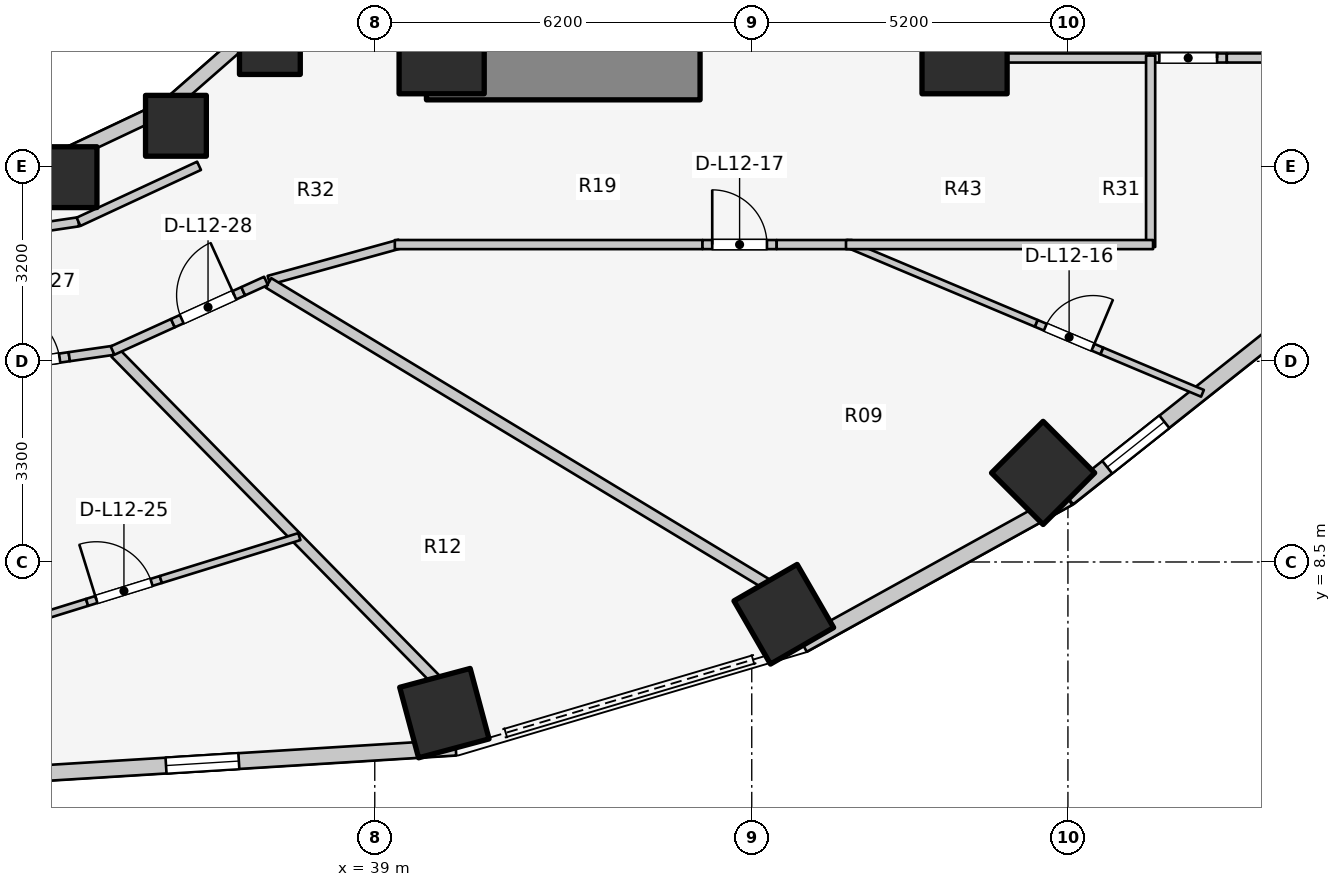
"""IFC4 building model, lengths in metres.
Left out: names, types, materials, properties, quantities, classifications, styles, units other than length and angle.
Written with IfcOpenShell. Run it as: python <this file> out.ifc"""

import sys

from ifc_helpers import new_model, si_unit, direction, frame, frame_2d, origin, origin_2d, place, context, subcontext, project, spatial, rectangle, extrude, element, fill, save


model = new_model("IFC4")
c1 = context("Model", 3, precision=1e-05, world=origin(), true_north=direction((0.0, 1.0)))
c2 = subcontext(c1, "Body", "Model", "MODEL_VIEW")
j1 = project(units=[si_unit("LENGTHUNIT", "METRE"), si_unit("PLANEANGLEUNIT", "RADIAN")], contexts=[c1])
p1 = place(None, origin())
s1 = spatial("IfcSite", under=j1, at=p1, CompositionType="ELEMENT")
p2 = place(p1, origin())
s2 = spatial("IfcBuilding", under=s1, at=p2, CompositionType="ELEMENT")
p3 = place(p2, frame((0.0, 0.0, 43.1)))
s3 = spatial("IfcBuildingStorey", under=s2, at=p3, CompositionType="ELEMENT", Elevation=43.1)
p4 = place(p3, frame((39.85, 16.55, 0.0), z_axis=(0.0, 0.0, 1.0), x_axis=(1.0, 0.0, 0.0)))
e1 = element("IfcWall", 1, at=p4, inside=s3, PredefinedType="SHEAR", context=c2, shape_type="SweptSolid", body=[
    extrude(rectangle(XDim=4.5, YDim=0.9, at=frame_2d((2.25, 0.0))), origin(), (0.0, 0.0, 1.0), 3.1),
])
for number, where, z_axis, x_axis in (
    (2, (40.1, 16.9, 0.0), (0.0, 0.0, 1.0), (1.0, 0.0, 0.0)),
    (3, (48.7, 16.9, 0.0), (0.0, 0.0, 1.0), (1.0, 0.0, 0.0)),
):
    element("IfcColumn", number, at=place(p3, frame(where, z_axis=z_axis, x_axis=x_axis)), inside=s3, PredefinedType="COLUMN", context=c2, shape_type="SweptSolid", body=[
        extrude(rectangle(XDim=1.4, YDim=1.4, at=origin_2d()), origin(), (0.0, 0.0, 1.0), 3.1),
    ])
p5 = place(p3, frame((33.931, 14.828, 0.0), z_axis=(0.0, 0.0, 1.0), x_axis=(1.0, 0.0, 0.0)))
e4 = element("IfcColumn", 4, at=p5, inside=s3, PredefinedType="COLUMN", context=c2, shape_type="SweptSolid", body=[
    extrude(rectangle(XDim=1.0, YDim=1.0, at=origin_2d()), origin(), (0.0, 0.0, 1.0), 3.1),
])
p6 = place(p3, frame((40.145, 6.014, 0.0), z_axis=(0.0, 0.0, 1.0), x_axis=(0.258819045103, -0.965925826289, 0.0)))
e5 = element("IfcColumn", 5, at=p6, inside=s3, PredefinedType="COLUMN", context=c2, shape_type="SweptSolid", body=[
    extrude(rectangle(XDim=1.2, YDim=1.2, at=origin_2d()), origin(), (0.0, 0.0, 1.0), 3.1),
])
p7 = place(p3, frame((35.73, 15.673, 0.0), z_axis=(0.0, 0.0, 1.0), x_axis=(1.0, 0.0, 0.0)))
e6 = element("IfcColumn", 6, at=p7, inside=s3, PredefinedType="COLUMN", context=c2, shape_type="SweptSolid", body=[
    extrude(rectangle(XDim=1.0, YDim=1.0, at=origin_2d()), origin(), (0.0, 0.0, 1.0), 3.1),
])
p8 = place(p3, frame((45.727, 7.641, 0.0), z_axis=(0.0, 0.0, 1.0), x_axis=(0.5, -0.866025403784, 0.0)))
e7 = element("IfcColumn", 7, at=p8, inside=s3, PredefinedType="COLUMN", context=c2, shape_type="SweptSolid", body=[
    extrude(rectangle(XDim=1.2, YDim=1.2, at=origin_2d()), origin(), (0.0, 0.0, 1.0), 3.1),
])
p9 = place(p3, frame((37.275, 17.018, 0.0), z_axis=(0.0, 0.0, 1.0), x_axis=(1.0, 0.0, 0.0)))
e8 = element("IfcColumn", 8, at=p9, inside=s3, PredefinedType="COLUMN", context=c2, shape_type="SweptSolid", body=[
    extrude(rectangle(XDim=1.0, YDim=1.0, at=origin_2d()), origin(), (0.0, 0.0, 1.0), 3.1),
])
p10 = place(p3, frame((49.992, 9.965, 0.0), z_axis=(0.0, 0.0, 1.0), x_axis=(0.707106781187, -0.707106781187, 0.0)))
e9 = element("IfcColumn", 9, at=p10, inside=s3, PredefinedType="COLUMN", context=c2, shape_type="SweptSolid", body=[
    extrude(rectangle(XDim=1.2, YDim=1.2, at=origin_2d()), origin(), (0.0, 0.0, 1.0), 3.1),
])
p11 = place(p3, frame((32.0, 14.88, 0.0), z_axis=(0.0, 0.0, 1.0), x_axis=(0.988901730308, 0.148571086668, 0.0)))
e10 = element("IfcWall", 10, at=p11, inside=s3, PredefinedType="STANDARD", context=c2, shape_type="SweptSolid", body=[
    extrude(rectangle(XDim=1.864, YDim=0.23, at=frame_2d((0.932, 0.0))), origin(), (0.0, 0.0, 1.0), 1.22),
])
p12 = place(p3, frame((33.843, 15.157, 0.0), z_axis=(0.0, 0.0, 1.0), x_axis=(0.904179699603, 0.427152280606, 0.0)))
e11 = element("IfcWall", 11, at=p12, inside=s3, PredefinedType="STANDARD", context=c2, shape_type="SweptSolid", body=[
    extrude(rectangle(XDim=1.899, YDim=0.23, at=frame_2d((0.95, 0.0))), origin(), (0.0, 0.0, 1.0), 1.22),
])
p13 = place(p3, frame((35.56, 15.968, 0.0), z_axis=(0.0, 0.0, 1.0), x_axis=(0.752576694707, 0.658504607869, 0.0)))
e12 = element("IfcWall", 12, at=p13, inside=s3, PredefinedType="STANDARD", context=c2, shape_type="SweptSolid", body=[
    extrude(rectangle(XDim=1.959, YDim=0.23, at=frame_2d((0.98, 0.0))), origin(), (0.0, 0.0, 1.0), 1.22),
])
p14 = place(p3, frame((32.0, 4.931, 0.0), z_axis=(0.0, 0.0, 1.0), x_axis=(0.998090514779, 0.061768311519, 0.0)))
e13 = element("IfcWall", 13, at=p14, inside=s3, PredefinedType="STANDARD", context=c2, shape_type="SweptSolid", body=[
    extrude(rectangle(XDim=8.348, YDim=0.26, at=frame_2d((4.174, 0.0))), origin(), (0.0, 0.0, 1.0), 1.22),
])
p15 = place(p14, frame((3.574, 0.0, 0.15)))
e14 = element("IfcOpeningElement", 14, at=p15, cuts=e13, PredefinedType="OPENING", context=c2, shape_type="SweptSolid", body=[
    extrude(rectangle(XDim=1.2, YDim=0.9, at=frame_2d((0.6, 0.45))), frame((0.0, 0.14, 0.0), z_axis=(0.0, -1.0, 0.0), x_axis=(1.0, 0.0, 0.0)), (0.0, 0.0, 1.0), 0.28),
])
p16 = place(p3, frame((46.042, 7.138, 0.0), z_axis=(0.0, 0.0, 1.0), x_axis=(0.875137303239, 0.483874674352, 0.0)))
e15 = element("IfcWall", 15, at=p16, inside=s3, PredefinedType="STANDARD", context=c2, shape_type="SweptSolid", body=[
    extrude(rectangle(XDim=4.985, YDim=0.26, at=frame_2d((2.493, 0.0))), origin(), (0.0, 0.0, 1.0), 1.22),
])
p17 = place(p3, frame((50.405, 9.55, 0.0), z_axis=(0.0, 0.0, 1.0), x_axis=(0.783123133379, 0.621866672179, 0.0)))
e16 = element("IfcWall", 16, at=p17, inside=s3, PredefinedType="STANDARD", context=c2, shape_type="SweptSolid", body=[
    extrude(rectangle(XDim=4.839, YDim=0.26, at=frame_2d((2.419, 0.0))), origin(), (0.0, 0.0, 1.0), 1.22),
])
p18 = place(p17, frame((0.819, 0.0, 0.15)))
e17 = element("IfcOpeningElement", 17, at=p18, cuts=e16, PredefinedType="OPENING", context=c2, shape_type="SweptSolid", body=[
    extrude(rectangle(XDim=1.2, YDim=0.9, at=frame_2d((0.6, 0.45))), frame((0.0, 0.14, 0.0), z_axis=(0.0, -1.0, 0.0), x_axis=(1.0, 0.0, 0.0)), (0.0, 0.0, 1.0), 0.28),
])
p19 = place(p3, frame((32.0, 13.78, 0.0), z_axis=(0.0, 0.0, 1.0), x_axis=(0.989268584896, 0.146108408166, 0.0)))
e18 = element("IfcWall", 18, at=p19, inside=s3, PredefinedType="PARTITIONING", context=c2, shape_type="SweptSolid", body=[
    extrude(rectangle(XDim=2.151, YDim=0.15, at=frame_2d((1.075, 0.0))), origin(), (0.0, 0.0, 1.0), 1.957),
])
p20 = place(p3, frame((34.127, 14.094, 0.0), z_axis=(0.0, 0.0, 1.0), x_axis=(0.906943449489, 0.421252393975, 0.0)))
e19 = element("IfcWall", 19, at=p20, inside=s3, PredefinedType="PARTITIONING", context=c2, shape_type="SweptSolid", body=[
    extrude(rectangle(XDim=2.186, YDim=0.15, at=frame_2d((1.093, 0.0))), origin(), (0.0, 0.0, 1.0), 1.957),
])
p21 = place(p3, frame((48.95, 16.788, 0.0), z_axis=(0.0, 0.0, 1.0), x_axis=(1.0, 0.0, 0.0)))
e20 = element("IfcWall", 20, at=p21, inside=s3, PredefinedType="PARTITIONING", context=c2, shape_type="SweptSolid", body=[
    extrude(rectangle(XDim=2.793, YDim=0.15, at=frame_2d((1.396, 0.0))), origin(), (0.0, 0.0, 1.0), 1.22),
])
p22 = place(p3, frame((51.743, 16.788, 0.0), z_axis=(0.0, 0.0, 1.0), x_axis=(1.0, 0.0, 0.0)))
e21 = element("IfcWall", 21, at=p22, inside=s3, PredefinedType="PARTITIONING", context=c2, shape_type="SweptSolid", body=[
    extrude(rectangle(XDim=1.27, YDim=0.15, at=frame_2d((0.635, 0.0))), origin(), (0.0, 0.0, 1.0), 2.575),
])
p23 = place(p22, frame((0.16, 0.0, 0.0)))
e22 = element("IfcOpeningElement", 22, at=p23, cuts=e21, PredefinedType="OPENING", context=c2, shape_type="SweptSolid", body=[
    extrude(rectangle(XDim=0.95, YDim=2.1, at=frame_2d((0.475, 1.05))), frame((0.0, 0.085, 0.0), z_axis=(0.0, -1.0, 0.0), x_axis=(1.0, 0.0, 0.0)), (0.0, 0.0, 1.0), 0.17),
])
p24 = place(p3, frame((53.013, 16.788, 0.0), z_axis=(0.0, 0.0, 1.0), x_axis=(1.0, 0.0, 0.0)))
e23 = element("IfcWall", 23, at=p24, inside=s3, PredefinedType="PARTITIONING", context=c2, shape_type="SweptSolid", body=[
    extrude(rectangle(XDim=3.973, YDim=0.15, at=frame_2d((1.987, 0.0))), origin(), (0.0, 0.0, 1.0), 2.575),
])
p25 = place(p3, frame((51.76, 13.68, 0.0), z_axis=(0.0, 0.0, 1.0), x_axis=(0.0, 1.0, 0.0)))
e24 = element("IfcWall", 24, at=p25, inside=s3, PredefinedType="PARTITIONING", context=c2, shape_type="SweptSolid", body=[
    extrude(rectangle(XDim=3.148, YDim=0.15, at=frame_2d((1.574, 0.0))), origin(), (0.0, 0.0, 1.0), 2.575),
])
p26 = place(p3, frame((46.754, 13.74, 0.0), z_axis=(0.0, 0.0, 1.0), x_axis=(0.921686848925, -0.387934727136, 0.0)))
e25 = element("IfcWall", 25, at=p26, inside=s3, PredefinedType="MOVABLE", context=c2, shape_type="SweptSolid", body=[
    extrude(rectangle(XDim=3.392, YDim=0.12, at=frame_2d((1.696, 0.0))), origin(), (0.0, 0.0, 1.0), 1.22),
])
p27 = place(p3, frame((49.88, 12.424, 0.0), z_axis=(0.0, 0.0, 1.0), x_axis=(0.92176888, -0.387739773384, 0.0)))
e26 = element("IfcWall", 26, at=p27, inside=s3, PredefinedType="MOVABLE", context=c2, shape_type="SweptSolid", body=[
    extrude(rectangle(XDim=1.17, YDim=0.12, at=frame_2d((0.585, 0.0))), origin(), (0.0, 0.0, 1.0), 2.11),
])
p28 = place(p27, frame((0.16, 0.0, 0.0)))
e27 = element("IfcOpeningElement", 27, at=p28, cuts=e26, PredefinedType="OPENING", context=c2, shape_type="SweptSolid", body=[
    extrude(rectangle(XDim=0.85, YDim=2.05, at=frame_2d((0.425, 1.025))), frame((0.0, 0.07, 0.0), z_axis=(0.0, -1.0, 0.0), x_axis=(1.0, 0.0, 0.0)), (0.0, 0.0, 1.0), 0.14),
])
p29 = place(p3, frame((50.959, 11.97, 0.0), z_axis=(0.0, 0.0, 1.0), x_axis=(0.921694272019, -0.387917090275, 0.0)))
e28 = element("IfcWall", 28, at=p29, inside=s3, PredefinedType="MOVABLE", context=c2, shape_type="SweptSolid", body=[
    extrude(rectangle(XDim=1.794, YDim=0.12, at=frame_2d((0.897, 0.0))), origin(), (0.0, 0.0, 1.0), 2.575),
])
p30 = place(p3, frame((37.258, 13.133, 0.0), z_axis=(0.0, 0.0, 1.0), x_axis=(0.963833843713, 0.266503886865, 0.0)))
e29 = element("IfcWall", 29, at=p30, inside=s3, PredefinedType="PARTITIONING", context=c2, shape_type="SweptSolid", body=[
    extrude(rectangle(XDim=2.232, YDim=0.15, at=frame_2d((1.116, 0.0))), origin(), (0.0, 0.0, 1.0), 1.957),
])
p31 = place(p3, frame((39.33, 13.72, 0.0), z_axis=(0.0, 0.0, 1.0), x_axis=(1.0, 0.0, 0.0)))
e30 = element("IfcWall", 30, at=p31, inside=s3, PredefinedType="PARTITIONING", context=c2, shape_type="SweptSolid", body=[
    extrude(rectangle(XDim=5.06, YDim=0.15, at=frame_2d((2.53, 0.0))), origin(), (0.0, 0.0, 1.0), 1.957),
])
p32 = place(p3, frame((44.39, 13.72, 0.0), z_axis=(0.0, 0.0, 1.0), x_axis=(1.0, 0.0, 0.0)))
e31 = element("IfcWall", 31, at=p32, inside=s3, PredefinedType="PARTITIONING", context=c2, shape_type="SweptSolid", body=[
    extrude(rectangle(XDim=1.22, YDim=0.15, at=frame_2d((0.61, 0.0))), origin(), (0.0, 0.0, 1.0), 2.575),
])
p33 = place(p32, frame((0.16, 0.0, 0.0)))
e32 = element("IfcOpeningElement", 32, at=p33, cuts=e31, PredefinedType="OPENING", context=c2, shape_type="SweptSolid", body=[
    extrude(rectangle(XDim=0.9, YDim=2.1, at=frame_2d((0.45, 1.05))), frame((0.0, 0.085, 0.0), z_axis=(0.0, -1.0, 0.0), x_axis=(1.0, 0.0, 0.0)), (0.0, 0.0, 1.0), 0.17),
])
p34 = place(p3, frame((45.61, 13.72, 0.0), z_axis=(0.0, 0.0, 1.0), x_axis=(1.0, 0.0, 0.0)))
e33 = element("IfcWall", 33, at=p34, inside=s3, PredefinedType="PARTITIONING", context=c2, shape_type="SweptSolid", body=[
    extrude(rectangle(XDim=1.24, YDim=0.15, at=frame_2d((0.62, 0.0))), origin(), (0.0, 0.0, 1.0), 2.575),
])
p35 = place(p3, frame((46.75, 13.72, 0.0), z_axis=(0.0, 0.0, 1.0), x_axis=(1.0, 0.0, 0.0)))
e34 = element("IfcWall", 34, at=p35, inside=s3, PredefinedType="PARTITIONING", context=c2, shape_type="SweptSolid", body=[
    extrude(rectangle(XDim=5.05, YDim=0.15, at=frame_2d((2.525, 0.0))), origin(), (0.0, 0.0, 1.0), 1.22),
])
p36 = place(p3, frame((34.733, 11.939, 0.0), z_axis=(0.0, 0.0, 1.0), x_axis=(0.700234780085, -0.713912636644, 0.0)))
e35 = element("IfcWall", 35, at=p36, inside=s3, PredefinedType="PARTITIONING", context=c2, shape_type="SweptSolid", body=[
    extrude(rectangle(XDim=7.515, YDim=0.18, at=frame_2d((3.757, 0.0))), origin(), (0.0, 0.0, 1.0), 1.957),
])
p37 = place(p3, frame((37.252, 13.09, 0.0), z_axis=(0.0, 0.0, 1.0), x_axis=(0.855817136021, -0.517278483694, 0.0)))
e36 = element("IfcWall", 36, at=p37, inside=s3, PredefinedType="PARTITIONING", context=c2, shape_type="SweptSolid", body=[
    extrude(rectangle(XDim=9.564, YDim=0.18, at=frame_2d((4.782, 0.0))), origin(), (0.0, 0.0, 1.0), 1.957),
])
p38 = place(p3, frame((31.99, 7.13, 0.0), z_axis=(0.0, 0.0, 1.0), x_axis=(0.955194959811, 0.295977344996, 0.0)))
e37 = element("IfcWall", 37, at=p38, inside=s3, PredefinedType="MOVABLE", context=c2, shape_type="SweptSolid", body=[
    extrude(rectangle(XDim=2.385, YDim=0.12, at=frame_2d((1.192, 0.0))), origin(), (0.0, 0.0, 1.0), 1.957),
])
p39 = place(p3, frame((34.268, 7.836, 0.0), z_axis=(0.0, 0.0, 1.0), x_axis=(0.95517852645, 0.296030374468, 0.0)))
e38 = element("IfcWall", 38, at=p39, inside=s3, PredefinedType="MOVABLE", context=c2, shape_type="SweptSolid", body=[
    extrude(rectangle(XDim=1.27, YDim=0.12, at=frame_2d((0.635, 0.0))), origin(), (0.0, 0.0, 1.0), 2.575),
])
p40 = place(p39, frame((0.16, 0.0, 0.0)))
e39 = element("IfcOpeningElement", 39, at=p40, cuts=e38, PredefinedType="OPENING", context=c2, shape_type="SweptSolid", body=[
    extrude(rectangle(XDim=0.95, YDim=2.1, at=frame_2d((0.475, 1.05))), frame((0.0, 0.07, 0.0), z_axis=(0.0, -1.0, 0.0), x_axis=(1.0, 0.0, 0.0)), (0.0, 0.0, 1.0), 0.14),
])
p41 = place(p3, frame((35.481, 8.212, 0.0), z_axis=(0.0, 0.0, 1.0), x_axis=(0.955194959811, 0.295977344996, 0.0)))
e40 = element("IfcWall", 40, at=p41, inside=s3, PredefinedType="MOVABLE", context=c2, shape_type="SweptSolid", body=[
    extrude(rectangle(XDim=2.385, YDim=0.12, at=frame_2d((1.192, 0.0))), origin(), (0.0, 0.0, 1.0), 2.575),
])
p42 = place(p3, frame((32.719, 11.695, 0.0), z_axis=(0.0, 0.0, 1.0), x_axis=(0.989721405299, 0.14300888047, 0.0)))
e41 = element("IfcWall", 41, at=p42, inside=s3, PredefinedType="PARTITIONING", context=c2, shape_type="SweptSolid", body=[
    extrude(rectangle(XDim=1.27, YDim=0.15, at=frame_2d((0.635, 0.0))), origin(), (0.0, 0.0, 1.0), 2.575),
])
p43 = place(p42, frame((0.16, 0.0, 0.0)))
e42 = element("IfcOpeningElement", 42, at=p43, cuts=e41, PredefinedType="OPENING", context=c2, shape_type="SweptSolid", body=[
    extrude(rectangle(XDim=0.95, YDim=2.1, at=frame_2d((0.475, 1.05))), frame((0.0, 0.085, 0.0), z_axis=(0.0, -1.0, 0.0), x_axis=(1.0, 0.0, 0.0)), (0.0, 0.0, 1.0), 0.17),
])
p44 = place(p3, frame((33.976, 11.876, 0.0), z_axis=(0.0, 0.0, 1.0), x_axis=(0.98974875873, 0.142819447526, 0.0)))
e43 = element("IfcWall", 43, at=p44, inside=s3, PredefinedType="PARTITIONING", context=c2, shape_type="SweptSolid", body=[
    extrude(rectangle(XDim=0.733, YDim=0.15, at=frame_2d((0.367, 0.0))), origin(), (0.0, 0.0, 1.0), 2.575),
])
p45 = place(p3, frame((34.687, 11.977, 0.0), z_axis=(0.0, 0.0, 1.0), x_axis=(0.910596482868, 0.413296558645, 0.0)))
e44 = element("IfcWall", 44, at=p45, inside=s3, PredefinedType="PARTITIONING", context=c2, shape_type="SweptSolid", body=[
    extrude(rectangle(XDim=1.09, YDim=0.15, at=frame_2d((0.545, 0.0))), origin(), (0.0, 0.0, 1.0), 1.957),
])
p46 = place(p3, frame((35.68, 12.427, 0.0), z_axis=(0.0, 0.0, 1.0), x_axis=(0.910524396382, 0.413455346552, 0.0)))
e45 = element("IfcWall", 45, at=p46, inside=s3, PredefinedType="PARTITIONING", context=c2, shape_type="SweptSolid", body=[
    extrude(rectangle(XDim=1.27, YDim=0.15, at=frame_2d((0.635, 0.0))), origin(), (0.0, 0.0, 1.0), 2.16),
])
p47 = place(p46, frame((0.16, 0.0, 0.0)))
e46 = element("IfcOpeningElement", 46, at=p47, cuts=e45, PredefinedType="OPENING", context=c2, shape_type="SweptSolid", body=[
    extrude(rectangle(XDim=0.95, YDim=2.1, at=frame_2d((0.475, 1.05))), frame((0.0, 0.085, 0.0), z_axis=(0.0, -1.0, 0.0), x_axis=(1.0, 0.0, 0.0)), (0.0, 0.0, 1.0), 0.17),
])
p48 = place(p3, frame((36.836, 12.952, 0.0), z_axis=(0.0, 0.0, 1.0), x_axis=(0.910630236002, 0.413222183915, 0.0)))
e47 = element("IfcWall", 47, at=p48, inside=s3, PredefinedType="PARTITIONING", context=c2, shape_type="SweptSolid", body=[
    extrude(rectangle(XDim=0.412, YDim=0.15, at=frame_2d((0.206, 0.0))), origin(), (0.0, 0.0, 1.0), 2.575),
])
p49 = place(p15, origin())
e48 = element("IfcWindow", 48, at=p49, inside=s3, PartitioningType="SINGLE_PANEL", PredefinedType="WINDOW", context=c2, shape_type="SweptSolid", body=[
    extrude(rectangle(XDim=1.2, YDim=0.9, at=frame_2d((0.6, 0.45))), frame((0.0, 0.03, 0.0), z_axis=(0.0, -1.0, 0.0), x_axis=(1.0, 0.0, 0.0)), (0.0, 0.0, 1.0), 0.06),
])
fill(e14, e48)
p50 = place(p18, origin())
e49 = element("IfcWindow", 49, at=p50, inside=s3, PartitioningType="SINGLE_PANEL", PredefinedType="WINDOW", context=c2, shape_type="SweptSolid", body=[
    extrude(rectangle(XDim=1.2, YDim=0.9, at=frame_2d((0.6, 0.45))), frame((0.0, 0.03, 0.0), z_axis=(0.0, -1.0, 0.0), x_axis=(1.0, 0.0, 0.0)), (0.0, 0.0, 1.0), 0.06),
])
fill(e17, e49)
p51 = place(p23, origin())
e50 = element("IfcDoor", 50, at=p51, inside=s3, OperationType="SINGLE_SWING_RIGHT", PredefinedType="DOOR", context=c2, shape_type="SweptSolid", body=[
    extrude(rectangle(XDim=0.95, YDim=2.1, at=frame_2d((0.475, 1.05))), frame((0.0, 0.025, 0.0), z_axis=(0.0, -1.0, 0.0), x_axis=(1.0, 0.0, 0.0)), (0.0, 0.0, 1.0), 0.05),
])
fill(e22, e50)
p52 = place(p28, origin())
e51 = element("IfcDoor", 51, at=p52, inside=s3, OperationType="SINGLE_SWING_RIGHT", PredefinedType="DOOR", context=c2, shape_type="SweptSolid", body=[
    extrude(rectangle(XDim=0.85, YDim=2.05, at=frame_2d((0.425, 1.025))), frame((0.0, 0.025, 0.0), z_axis=(0.0, -1.0, 0.0), x_axis=(1.0, 0.0, 0.0)), (0.0, 0.0, 1.0), 0.05),
])
fill(e27, e51)
p53 = place(p33, origin())
e52 = element("IfcDoor", 52, at=p53, inside=s3, OperationType="SINGLE_SWING_LEFT", PredefinedType="DOOR", context=c2, shape_type="SweptSolid", body=[
    extrude(rectangle(XDim=0.9, YDim=2.1, at=frame_2d((0.45, 1.05))), frame((0.0, 0.025, 0.0), z_axis=(0.0, -1.0, 0.0), x_axis=(1.0, 0.0, 0.0)), (0.0, 0.0, 1.0), 0.05),
])
fill(e32, e52)
p54 = place(p40, origin())
e53 = element("IfcDoor", 53, at=p54, inside=s3, OperationType="SINGLE_SWING_LEFT", PredefinedType="DOOR", context=c2, shape_type="SweptSolid", body=[
    extrude(rectangle(XDim=0.95, YDim=2.1, at=frame_2d((0.475, 1.05))), frame((0.0, 0.025, 0.0), z_axis=(0.0, -1.0, 0.0), x_axis=(1.0, 0.0, 0.0)), (0.0, 0.0, 1.0), 0.05),
])
fill(e39, e53)
p55 = place(p43, origin())
e54 = element("IfcDoor", 54, at=p55, inside=s3, OperationType="SINGLE_SWING_LEFT", PredefinedType="DOOR", context=c2, shape_type="SweptSolid", body=[
    extrude(rectangle(XDim=0.95, YDim=2.1, at=frame_2d((0.475, 1.05))), frame((0.0, 0.025, 0.0), z_axis=(0.0, -1.0, 0.0), x_axis=(1.0, 0.0, 0.0)), (0.0, 0.0, 1.0), 0.05),
])
fill(e42, e54)
p56 = place(p47, origin())
e55 = element("IfcDoor", 55, at=p56, inside=s3, OperationType="SINGLE_SWING_RIGHT", PredefinedType="DOOR", context=c2, shape_type="SweptSolid", body=[
    extrude(rectangle(XDim=0.95, YDim=2.1, at=frame_2d((0.475, 1.05))), frame((0.0, 0.025, 0.0), z_axis=(0.0, -1.0, 0.0), x_axis=(1.0, 0.0, 0.0)), (0.0, 0.0, 1.0), 0.05),
])
fill(e46, e55)
save(model, sys.argv[1])
